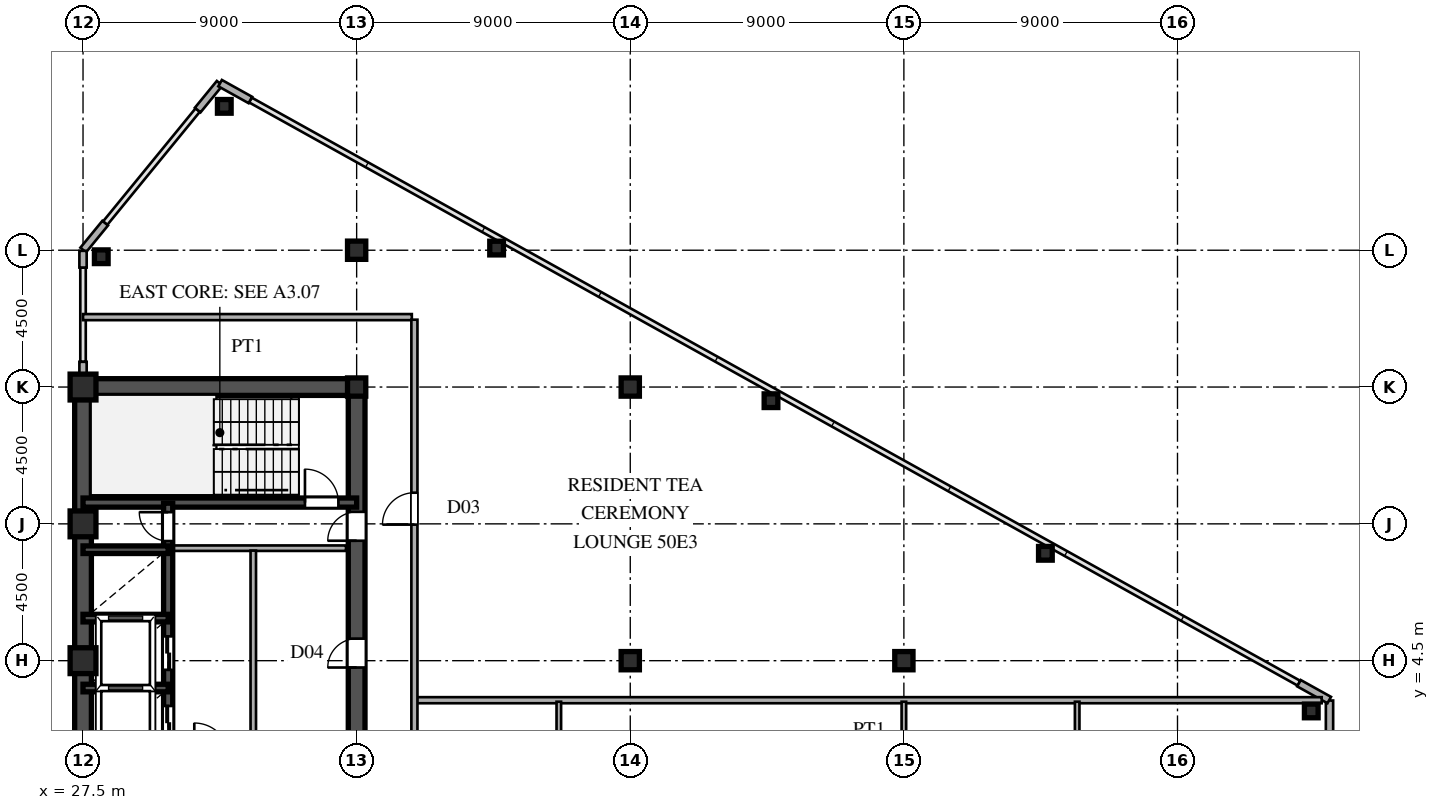
"""IFC4 building model, lengths in metres.
Left out: names, types, materials, properties, quantities, classifications, styles, units other than length and angle.
Written with IfcOpenShell. Run it as: python <this file> out.ifc"""

import sys

from ifc_helpers import new_model, si_unit, direction, frame, frame_2d, origin, origin_2d, place, context, subcontext, project, spatial, rectangle, hollow_rectangle, i_section, extrude, source, transform, mapped, element, fill, save


model = new_model("IFC4")
c1 = context("Model", 3, precision=1e-05, world=origin(), true_north=direction((0.0, 1.0)))
c2 = subcontext(c1, "Body", "Model", "MODEL_VIEW")
j1 = project(units=[si_unit("LENGTHUNIT", "METRE"), si_unit("PLANEANGLEUNIT", "RADIAN")], contexts=[c1])
p1 = place(None, origin())
s1 = spatial("IfcSite", under=j1, at=p1, CompositionType="ELEMENT")
p2 = place(p1, origin())
s2 = spatial("IfcBuilding", under=s1, at=p2, CompositionType="ELEMENT")
p3 = place(p2, frame((0.0, 0.0, 188.7)))
s3 = spatial("IfcBuildingStorey", under=s2, at=p3, CompositionType="ELEMENT", Elevation=188.7)
m1 = source(origin(), c2, "Body", "SweptSolid", [
    extrude(hollow_rectangle(XDim=0.85, YDim=0.85, WallThickness=0.036, at=origin_2d()), origin(), (0.0, 0.0, 1.0), 3.6),
])
for number, where, z_axis, x_axis in (
    (1, (27.5, 4.5, 0.0), (0.0, 0.0, 1.0), (1.0, 0.0, 0.0)),
    (2, (27.5, 9.0, 0.0), (0.0, 0.0, 1.0), (1.0, 0.0, 0.0)),
    (3, (27.5, 13.5, 0.0), (0.0, 0.0, 1.0), (1.0, 0.0, 0.0)),
):
    element("IfcColumn", number, at=place(p3, frame(where, z_axis=z_axis, x_axis=x_axis)), inside=s3, PredefinedType="COLUMN", context=c2, shape_type="MappedRepresentation", body=[
        mapped(m1, transform((0.0, 0.0, 0.0), scale=1.0)),
    ])
m2 = source(origin(), c2, "Body", "SweptSolid", [
    extrude(i_section(OverallWidth=0.6, OverallDepth=0.6, WebThickness=0.025, FlangeThickness=0.04, at=origin_2d()), origin(), (0.0, 0.0, 1.0), 3.6),
])
for number, where, z_axis, x_axis in (
    (4, (36.5, 13.5, 0.0), (0.0, 0.0, 1.0), (1.0, 0.0, 0.0)),
    (5, (36.5, 18.0, 0.0), (0.0, 0.0, 1.0), (1.0, 0.0, 0.0)),
    (6, (45.5, 4.5, 0.0), (0.0, 0.0, 1.0), (1.0, 0.0, 0.0)),
    (7, (45.5, 13.5, 0.0), (0.0, 0.0, 1.0), (1.0, 0.0, 0.0)),
    (8, (54.5, 4.5, 0.0), (0.0, 0.0, 1.0), (1.0, 0.0, 0.0)),
):
    element("IfcColumn", number, at=place(p3, frame(where, z_axis=z_axis, x_axis=x_axis)), inside=s3, PredefinedType="COLUMN", context=c2, shape_type="MappedRepresentation", body=[
        mapped(m2, transform((0.0, 0.0, 0.0), scale=1.0)),
    ])
m3 = source(origin(), c2, "Body", "SweptSolid", [
    extrude(hollow_rectangle(XDim=0.45, YDim=0.45, WallThickness=0.018, at=origin_2d()), origin(), (0.0, 0.0, 1.0), 3.6),
])
for number, where, z_axis, x_axis in (
    (9, (67.9, 2.847, 0.0), (0.0, 0.0, 1.0), (1.0, 0.0, 0.0)),
    (10, (32.147, 22.732, 0.0), (0.0, 0.0, 1.0), (1.0, 0.0, 0.0)),
    (11, (28.1, 17.786, 0.0), (0.0, 0.0, 1.0), (1.0, 0.0, 0.0)),
    (12, (41.104, 18.071, 0.0), (0.0, 0.0, 1.0), (1.0, 0.0, 0.0)),
    (13, (50.129, 13.051, 0.0), (0.0, 0.0, 1.0), (1.0, 0.0, 0.0)),
    (14, (59.155, 8.031, 0.0), (0.0, 0.0, 1.0), (1.0, 0.0, 0.0)),
):
    element("IfcColumn", number, at=place(p3, frame(where, z_axis=z_axis, x_axis=x_axis)), inside=s3, PredefinedType="COLUMN", context=c2, shape_type="MappedRepresentation", body=[
        mapped(m3, transform((0.0, 0.0, 0.0), scale=1.0)),
    ])
for number, where, z_axis, x_axis in (
    (15, (68.5, 2.05, 0.0), (0.0, 0.0, 1.0), (0.0, 1.0, 0.0)),
    (16, (68.491, 3.205, 0.0), (0.0, 0.0, 1.0), (-0.874, 0.486, 0.0)),
    (17, (33.005, 22.941, 0.0), (0.0, 0.0, 1.0), (-0.874, 0.486, 0.0)),
):
    element("IfcWall", number, at=place(p3, frame(where, z_axis=z_axis, x_axis=x_axis)), inside=s3, PredefinedType="SOLIDWALL", context=c2, shape_type="SweptSolid", body=[
        extrude(rectangle(XDim=1.14, YDim=0.24, at=frame_2d((0.57, 0.0))), origin(), (0.0, 0.0, 1.0), 3.38),
    ])
for number, where, z_axis, x_axis in (
    (18, (31.994, 23.492, 0.0), (0.0, 0.0, 1.0), (-0.633, -0.774, 0.0)),
    (19, (28.228, 18.89, 0.0), (0.0, 0.0, 1.0), (-0.633, -0.774, 0.0)),
):
    element("IfcWall", number, at=place(p3, frame(where, z_axis=z_axis, x_axis=x_axis)), inside=s3, PredefinedType="SOLIDWALL", context=c2, shape_type="SweptSolid", body=[
        extrude(rectangle(XDim=1.14, YDim=0.24, at=frame_2d((0.57, 0.0))), origin(), (0.0, 0.0, 1.0), 3.38),
    ])
p4 = place(p3, frame((27.5, 13.78, 0.0), z_axis=(0.0, 0.0, 1.0), x_axis=(0.0, 1.0, 0.0)))
e20 = element("IfcWall", 20, at=p4, inside=s3, PredefinedType="SOLIDWALL", context=c2, shape_type="SweptSolid", body=[
    extrude(rectangle(XDim=0.55, YDim=0.24, at=frame_2d((0.275, 0.0))), origin(), (0.0, 0.0, 1.0), 2.88),
])
p5 = place(p3, frame((27.5, 17.43, 0.0), z_axis=(0.0, 0.0, 1.0), x_axis=(0.0, 1.0, 0.0)))
e21 = element("IfcWall", 21, at=p5, inside=s3, PredefinedType="SOLIDWALL", context=c2, shape_type="SweptSolid", body=[
    extrude(rectangle(XDim=0.55, YDim=0.24, at=frame_2d((0.275, 0.0))), origin(), (0.0, 0.0, 1.0), 3.38),
])
p6 = place(p3, frame((27.5, 1.3, 0.0), z_axis=(0.0, 0.0, 1.0), x_axis=(0.0, 1.0, 0.0)))
e22 = element("IfcWall", 22, at=p6, inside=s3, PredefinedType="SHEAR", context=c2, shape_type="SweptSolid", body=[
    extrude(rectangle(XDim=12.2, YDim=0.55, at=frame_2d((6.1, 0.0))), origin(), (0.0, 0.0, 1.0), 3.38),
])
p7 = place(p3, frame((27.5, 13.5, 0.0), z_axis=(0.0, 0.0, 1.0), x_axis=(1.0, 0.0, 0.0)))
e23 = element("IfcWall", 23, at=p7, inside=s3, PredefinedType="SHEAR", context=c2, shape_type="SweptSolid", body=[
    extrude(rectangle(XDim=9.0, YDim=0.55, at=frame_2d((4.5, 0.0))), origin(), (0.0, 0.0, 1.0), 3.38),
])
p8 = place(p3, frame((36.5, 8.2, 0.0), z_axis=(0.0, 0.0, 1.0), x_axis=(0.0, 1.0, 0.0)))
e24 = element("IfcWall", 24, at=p8, inside=s3, PredefinedType="SHEAR", context=c2, shape_type="SweptSolid", body=[
    extrude(rectangle(XDim=5.45, YDim=0.55, at=frame_2d((2.725, 0.0))), origin(), (0.0, 0.0, 1.0), 3.38),
])
p9 = place(p8, frame((0.245, 0.0, 0.0)))
e25 = element("IfcOpeningElement", 25, at=p9, cuts=e24, PredefinedType="OPENING", context=c2, shape_type="SweptSolid", body=[
    extrude(rectangle(XDim=0.95, YDim=2.15, at=frame_2d((0.475, 1.075))), frame((0.0, 0.285, 0.0), z_axis=(0.0, -1.0, 0.0), x_axis=(1.0, 0.0, 0.0)), (0.0, 0.0, 1.0), 0.57),
])
p10 = place(p3, frame((36.5, 1.3, 0.0), z_axis=(0.0, 0.0, 1.0), x_axis=(0.0, 1.0, 0.0)))
e26 = element("IfcWall", 26, at=p10, inside=s3, PredefinedType="SHEAR", context=c2, shape_type="SweptSolid", body=[
    extrude(rectangle(XDim=6.9, YDim=0.55, at=frame_2d((3.45, 0.0))), origin(), (0.0, 0.0, 1.0), 3.38),
])
p11 = place(p10, frame((2.975, 0.0, 0.0)))
e27 = element("IfcOpeningElement", 27, at=p11, cuts=e26, PredefinedType="OPENING", context=c2, shape_type="SweptSolid", body=[
    extrude(rectangle(XDim=0.95, YDim=2.15, at=frame_2d((0.475, 1.075))), frame((0.0, 0.285, 0.0), z_axis=(0.0, -1.0, 0.0), x_axis=(1.0, 0.0, 0.0)), (0.0, 0.0, 1.0), 0.57),
])
p12 = place(p3, frame((27.5, 9.7, 0.0), z_axis=(0.0, 0.0, 1.0), x_axis=(1.0, 0.0, 0.0)))
e28 = element("IfcWall", 28, at=p12, inside=s3, PredefinedType="SHEAR", context=c2, shape_type="SweptSolid", body=[
    extrude(rectangle(XDim=9.0, YDim=0.3, at=frame_2d((4.5, 0.0))), origin(), (0.0, 0.0, 1.0), 3.38),
])
p13 = place(p12, frame((7.3, 0.0, 0.0)))
e29 = element("IfcOpeningElement", 29, at=p13, cuts=e28, PredefinedType="OPENING", context=c2, shape_type="SweptSolid", body=[
    extrude(rectangle(XDim=1.1, YDim=2.2, at=frame_2d((0.55, 1.1))), frame((0.0, 0.16, 0.0), z_axis=(0.0, -1.0, 0.0), x_axis=(1.0, 0.0, 0.0)), (0.0, 0.0, 1.0), 0.32),
])
for number, where, z_axis, x_axis in (
    (30, (27.5, 3.6, 0.0), (0.0, 0.0, 1.0), (1.0, 0.0, 0.0)),
    (31, (27.5, 5.9, 0.0), (0.0, 0.0, 1.0), (1.0, 0.0, 0.0)),
    (32, (27.5, 8.15, 0.0), (0.0, 0.0, 1.0), (1.0, 0.0, 0.0)),
):
    element("IfcWall", number, at=place(p3, frame(where, z_axis=z_axis, x_axis=x_axis)), inside=s3, PredefinedType="SHEAR", context=c2, shape_type="SweptSolid", body=[
        extrude(rectangle(XDim=2.8, YDim=0.25, at=frame_2d((1.4, 0.0))), origin(), (0.0, 0.0, 1.0), 3.38),
    ])
p14 = place(p3, frame((30.3, 1.32, 0.0), z_axis=(0.0, 0.0, 1.0), x_axis=(0.0, 1.0, 0.0)))
e33 = element("IfcWall", 33, at=p14, inside=s3, PredefinedType="SHEAR", context=c2, shape_type="SweptSolid", body=[
    extrude(rectangle(XDim=2.28, YDim=0.3, at=frame_2d((1.14, 0.0))), origin(), (0.0, 0.0, 1.0), 3.38),
])
p15 = place(p14, frame((0.59, 0.0, 0.0)))
e34 = element("IfcOpeningElement", 34, at=p15, cuts=e33, PredefinedType="OPENING", context=c2, shape_type="SweptSolid", body=[
    extrude(rectangle(XDim=1.1, YDim=2.2, at=frame_2d((0.55, 1.1))), frame((0.0, 0.16, 0.0), z_axis=(0.0, -1.0, 0.0), x_axis=(1.0, 0.0, 0.0)), (0.0, 0.0, 1.0), 0.32),
])
p16 = place(p3, frame((30.3, 3.6, 0.0), z_axis=(0.0, 0.0, 1.0), x_axis=(0.0, 1.0, 0.0)))
e35 = element("IfcWall", 35, at=p16, inside=s3, PredefinedType="SHEAR", context=c2, shape_type="SweptSolid", body=[
    extrude(rectangle(XDim=2.3, YDim=0.3, at=frame_2d((1.15, 0.0))), origin(), (0.0, 0.0, 1.0), 3.38),
])
p17 = place(p16, frame((0.6, 0.0, 0.0)))
e36 = element("IfcOpeningElement", 36, at=p17, cuts=e35, PredefinedType="OPENING", context=c2, shape_type="SweptSolid", body=[
    extrude(rectangle(XDim=1.1, YDim=2.2, at=frame_2d((0.55, 1.1))), frame((0.0, 0.16, 0.0), z_axis=(0.0, -1.0, 0.0), x_axis=(1.0, 0.0, 0.0)), (0.0, 0.0, 1.0), 0.32),
])
p18 = place(p3, frame((30.3, 5.9, 0.0), z_axis=(0.0, 0.0, 1.0), x_axis=(0.0, 1.0, 0.0)))
e37 = element("IfcWall", 37, at=p18, inside=s3, PredefinedType="SHEAR", context=c2, shape_type="SweptSolid", body=[
    extrude(rectangle(XDim=2.25, YDim=0.3, at=frame_2d((1.125, 0.0))), origin(), (0.0, 0.0, 1.0), 3.38),
])
p19 = place(p3, frame((30.3, 8.15, 0.0), z_axis=(0.0, 0.0, 1.0), x_axis=(0.0, 1.0, 0.0)))
e38 = element("IfcWall", 38, at=p19, inside=s3, PredefinedType="SHEAR", context=c2, shape_type="SweptSolid", body=[
    extrude(rectangle(XDim=1.53, YDim=0.3, at=frame_2d((0.765, 0.0))), origin(), (0.0, 0.0, 1.0), 3.38),
])
p20 = place(p19, frame((0.285, 0.0, 0.0)))
e39 = element("IfcOpeningElement", 39, at=p20, cuts=e38, PredefinedType="OPENING", context=c2, shape_type="SweptSolid", body=[
    extrude(rectangle(XDim=0.95, YDim=2.15, at=frame_2d((0.475, 1.075))), frame((0.0, 0.16, 0.0), z_axis=(0.0, -1.0, 0.0), x_axis=(1.0, 0.0, 0.0)), (0.0, 0.0, 1.0), 0.32),
])
p21 = place(p3, frame((30.45, 8.2, 0.0), z_axis=(0.0, 0.0, 1.0), x_axis=(1.0, 0.0, 0.0)))
e40 = element("IfcWall", 40, at=p21, inside=s3, PredefinedType="PARTITIONING", context=c2, shape_type="SweptSolid", body=[
    extrude(rectangle(XDim=5.7, YDim=0.18, at=frame_2d((2.85, 0.0))), origin(), (0.0, 0.0, 1.0), 3.38),
])
p22 = place(p3, frame((33.1, 1.38, 0.0), z_axis=(0.0, 0.0, 1.0), x_axis=(0.0, 1.0, 0.0)))
e41 = element("IfcWall", 41, at=p22, inside=s3, PredefinedType="PARTITIONING", context=c2, shape_type="SweptSolid", body=[
    extrude(rectangle(XDim=6.74, YDim=0.18, at=frame_2d((3.37, 0.0))), origin(), (0.0, 0.0, 1.0), 3.38),
])
p23 = place(p3, frame((38.48, 3.2, 0.0), z_axis=(0.0, 0.0, 1.0), x_axis=(1.0, 0.0, 0.0)))
e42 = element("IfcWall", 42, at=p23, inside=s3, PredefinedType="PARTITIONING", context=c2, shape_type="SweptSolid", body=[
    extrude(rectangle(XDim=29.763, YDim=0.2, at=frame_2d((14.881, 0.0))), origin(), (0.0, 0.0, 1.0), 3.38),
])
p24 = place(p3, frame((27.5, 15.8, 0.0), z_axis=(0.0, 0.0, 1.0), x_axis=(1.0, 0.0, 0.0)))
e43 = element("IfcWall", 43, at=p24, inside=s3, PredefinedType="PARTITIONING", context=c2, shape_type="SweptSolid", body=[
    extrude(rectangle(XDim=10.815, YDim=0.2, at=frame_2d((5.407, 0.0))), origin(), (0.0, 0.0, 1.0), 3.38),
])
p25 = place(p3, frame((38.4, -15.715, 0.0), z_axis=(0.0, 0.0, 1.0), x_axis=(0.0, 1.0, 0.0)))
e44 = element("IfcWall", 44, at=p25, inside=s3, PredefinedType="PARTITIONING", context=c2, shape_type="SweptSolid", body=[
    extrude(rectangle(XDim=31.43, YDim=0.2, at=frame_2d((15.715, 0.0))), origin(), (0.0, 0.0, 1.0), 3.38),
])
p26 = place(p25, frame((2.39, 0.0, 0.0)))
e45 = element("IfcOpeningElement", 45, at=p26, cuts=e44, PredefinedType="OPENING", context=c2, shape_type="SweptSolid", body=[
    extrude(rectangle(XDim=1.05, YDim=2.25, at=frame_2d((0.525, 1.125))), frame((0.0, 0.11, 0.0), z_axis=(0.0, -1.0, 0.0), x_axis=(1.0, 0.0, 0.0)), (0.0, 0.0, 1.0), 0.22),
])
p27 = place(p25, frame((11.695, 0.0, 0.0)))
e46 = element("IfcOpeningElement", 46, at=p27, cuts=e44, PredefinedType="OPENING", context=c2, shape_type="SweptSolid", body=[
    extrude(rectangle(XDim=1.05, YDim=2.25, at=frame_2d((0.525, 1.125))), frame((0.0, 0.11, 0.0), z_axis=(0.0, -1.0, 0.0), x_axis=(1.0, 0.0, 0.0)), (0.0, 0.0, 1.0), 0.22),
])
p28 = place(p25, frame((24.69, 0.0, 0.0)))
e47 = element("IfcOpeningElement", 47, at=p28, cuts=e44, PredefinedType="OPENING", context=c2, shape_type="SweptSolid", body=[
    extrude(rectangle(XDim=1.05, YDim=2.25, at=frame_2d((0.525, 1.125))), frame((0.0, 0.11, 0.0), z_axis=(0.0, -1.0, 0.0), x_axis=(1.0, 0.0, 0.0)), (0.0, 0.0, 1.0), 0.22),
])
p29 = place(p3, frame((43.15, -0.648, 0.0), z_axis=(0.0, 0.0, 1.0), x_axis=(0.0, 1.0, 0.0)))
e48 = element("IfcWall", 48, at=p29, inside=s3, PredefinedType="PARTITIONING", context=c2, shape_type="SweptSolid", body=[
    extrude(rectangle(XDim=3.798, YDim=0.15, at=frame_2d((1.899, 0.0))), origin(), (0.0, 0.0, 1.0), 3.38),
])
p30 = place(p3, frame((54.5, -9.75, 0.0), z_axis=(0.0, 0.0, 1.0), x_axis=(0.0, 1.0, 0.0)))
e49 = element("IfcWall", 49, at=p30, inside=s3, PredefinedType="PARTITIONING", context=c2, shape_type="SweptSolid", body=[
    extrude(rectangle(XDim=12.9, YDim=0.15, at=frame_2d((6.45, 0.0))), origin(), (0.0, 0.0, 1.0), 2.78),
])
p31 = place(p30, frame((5.975, 0.0, 0.0)))
e50 = element("IfcOpeningElement", 50, at=p31, cuts=e49, PredefinedType="OPENING", context=c2, shape_type="SweptSolid", body=[
    extrude(rectangle(XDim=0.95, YDim=2.15, at=frame_2d((0.475, 1.075))), frame((0.0, 0.085, 0.0), z_axis=(0.0, -1.0, 0.0), x_axis=(1.0, 0.0, 0.0)), (0.0, 0.0, 1.0), 0.17),
])
p32 = place(p3, frame((60.2, -5.417, 0.0), z_axis=(0.0, 0.0, 1.0), x_axis=(0.0, 1.0, 0.0)))
e51 = element("IfcWall", 51, at=p32, inside=s3, PredefinedType="PARTITIONING", context=c2, shape_type="SweptSolid", body=[
    extrude(rectangle(XDim=8.567, YDim=0.15, at=frame_2d((4.283, 0.0))), origin(), (0.0, 0.0, 1.0), 3.38),
])
p33 = place(p32, frame((1.642, 0.0, 0.0)))
e52 = element("IfcOpeningElement", 52, at=p33, cuts=e51, PredefinedType="OPENING", context=c2, shape_type="SweptSolid", body=[
    extrude(rectangle(XDim=0.95, YDim=2.15, at=frame_2d((0.475, 1.075))), frame((0.0, 0.085, 0.0), z_axis=(0.0, -1.0, 0.0), x_axis=(1.0, 0.0, 0.0)), (0.0, 0.0, 1.0), 0.17),
])
m4 = source(origin(), c2, "Body", "SweptSolid", [
    extrude(rectangle(XDim=0.95, YDim=2.15, at=frame_2d((0.475, 1.075))), frame((0.0, 0.025, 0.0), z_axis=(0.0, -1.0, 0.0), x_axis=(1.0, 0.0, 0.0)), (0.0, 0.0, 1.0), 0.05),
])
p34 = place(p9, origin())
e53 = element("IfcDoor", 53, at=p34, inside=s3, OperationType="SINGLE_SWING_LEFT", PredefinedType="DOOR", context=c2, shape_type="MappedRepresentation", body=[
    mapped(m4, transform((0.0, 0.0, 0.0), scale=1.0)),
])
fill(e25, e53)
p35 = place(p11, origin())
e54 = element("IfcDoor", 54, at=p35, inside=s3, OperationType="SINGLE_SWING_LEFT", PredefinedType="DOOR", context=c2, shape_type="MappedRepresentation", body=[
    mapped(m4, transform((0.0, 0.0, 0.0), scale=1.0)),
])
fill(e27, e54)
m5 = source(origin(), c2, "Body", "SweptSolid", [
    extrude(rectangle(XDim=1.1, YDim=2.2, at=frame_2d((0.55, 1.1))), frame((0.0, 0.025, 0.0), z_axis=(0.0, -1.0, 0.0), x_axis=(1.0, 0.0, 0.0)), (0.0, 0.0, 1.0), 0.05),
])
p36 = place(p13, origin())
e55 = element("IfcDoor", 55, at=p36, inside=s3, OperationType="SINGLE_SWING_LEFT", PredefinedType="DOOR", context=c2, shape_type="MappedRepresentation", body=[
    mapped(m5, transform((0.0, 0.0, 0.0), scale=1.0)),
])
fill(e29, e55)
m6 = source(origin(), c2, "Body", "SweptSolid", [
    extrude(rectangle(XDim=1.1, YDim=2.2, at=frame_2d((0.55, 1.1))), frame((0.0, 0.025, 0.0), z_axis=(0.0, -1.0, 0.0), x_axis=(1.0, 0.0, 0.0)), (0.0, 0.0, 1.0), 0.05),
])
p37 = place(p15, origin())
e56 = element("IfcDoor", 56, at=p37, inside=s3, OperationType="DOUBLE_DOOR_SLIDING", PredefinedType="DOOR", context=c2, shape_type="MappedRepresentation", body=[
    mapped(m6, transform((0.0, 0.0, 0.0), scale=1.0)),
])
fill(e34, e56)
p38 = place(p17, origin())
e57 = element("IfcDoor", 57, at=p38, inside=s3, OperationType="DOUBLE_DOOR_SLIDING", PredefinedType="DOOR", context=c2, shape_type="MappedRepresentation", body=[
    mapped(m6, transform((0.0, 0.0, 0.0), scale=1.0)),
])
fill(e36, e57)
p39 = place(p20, origin())
e58 = element("IfcDoor", 58, at=p39, inside=s3, OperationType="SINGLE_SWING_RIGHT", PredefinedType="DOOR", context=c2, shape_type="MappedRepresentation", body=[
    mapped(m4, transform((0.0, 0.0, 0.0), scale=1.0)),
])
fill(e39, e58)
m7 = source(origin(), c2, "Body", "SweptSolid", [
    extrude(rectangle(XDim=1.05, YDim=2.25, at=frame_2d((0.525, 1.125))), frame((0.0, 0.025, 0.0), z_axis=(0.0, -1.0, 0.0), x_axis=(1.0, 0.0, 0.0)), (0.0, 0.0, 1.0), 0.05),
])
p40 = place(p28, origin())
e59 = element("IfcDoor", 59, at=p40, inside=s3, OperationType="SINGLE_SWING_LEFT", PredefinedType="DOOR", context=c2, shape_type="MappedRepresentation", body=[
    mapped(m7, transform((0.0, 0.0, 0.0), scale=1.0)),
])
fill(e47, e59)
save(model, sys.argv[1])
